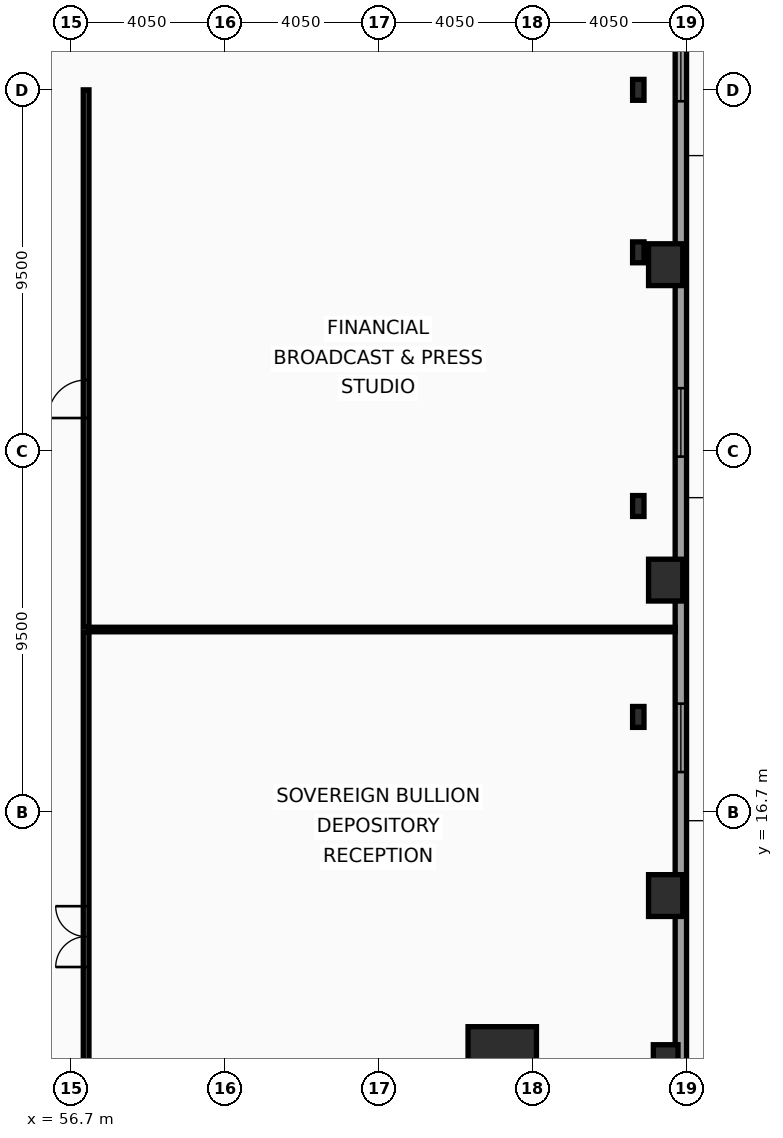
"""IFC4 building model, lengths in metres.
Left out: names, types, materials, properties, quantities, classifications, styles, units other than length and angle.
Written with IfcOpenShell. Run it as: python <this file> out.ifc"""

import sys

from ifc_helpers import new_model, si_unit, direction, frame, frame_2d, origin, origin_2d, place, context, subcontext, project, spatial, rectangle, hollow_rectangle, i_section, extrude, element, fill, save


model = new_model("IFC4")
c1 = context("Model", 3, precision=1e-05, world=origin(), true_north=direction((0.0, 1.0)))
c2 = subcontext(c1, "Body", "Model", "MODEL_VIEW")
j1 = project(units=[si_unit("LENGTHUNIT", "METRE"), si_unit("PLANEANGLEUNIT", "RADIAN")], contexts=[c1])
p1 = place(None, origin())
s1 = spatial("IfcSite", under=j1, at=p1, CompositionType="ELEMENT")
p2 = place(p1, origin())
s2 = spatial("IfcBuilding", under=s1, at=p2, CompositionType="ELEMENT")
p3 = place(p2, origin())
s3 = spatial("IfcBuildingStorey", under=s2, at=p3, CompositionType="ELEMENT", Elevation=0.0)
p4 = place(p3, frame((68.05, 10.15, 0.0), z_axis=(0.0, 0.0, 1.0), x_axis=(1.0, 0.0, 0.0)))
e1 = element("IfcColumn", 1, at=p4, inside=s3, PredefinedType="COLUMN", context=c2, shape_type="SweptSolid", body=[
    extrude(hollow_rectangle(XDim=1.8, YDim=1.8, WallThickness=0.08, at=origin_2d()), origin(), (0.0, 0.0, 1.0), 5.4),
])
for number, where, z_axis, x_axis in (
    (2, (71.63, 19.2, 0.0), (0.0, 0.0, 1.0), (1.0, 0.0, 0.0)),
    (3, (71.63, 24.75, 0.0), (0.0, 0.0, 1.0), (1.0, 0.0, 0.0)),
    (4, (71.63, 31.425, 0.0), (0.0, 0.0, 1.0), (1.0, 0.0, 0.0)),
    (5, (71.63, 35.7, 0.0), (0.0, 0.0, 1.0), (1.0, 0.0, 0.0)),
):
    element("IfcColumn", number, at=place(p3, frame(where, z_axis=z_axis, x_axis=x_axis)), inside=s3, PredefinedType="COLUMN", context=c2, shape_type="SweptSolid", body=[
        extrude(i_section(OverallWidth=0.3, OverallDepth=0.55, WebThickness=0.015, FlangeThickness=0.029, at=origin_2d()), origin(), (0.0, 0.0, 1.0), 5.4),
    ])
p5 = place(p3, frame((72.35, 10.15, 0.0), z_axis=(0.0, 0.0, 1.0), x_axis=(1.0, 0.0, 0.0)))
e6 = element("IfcColumn", 6, at=p5, inside=s3, PredefinedType="PILASTER", context=c2, shape_type="SweptSolid", body=[
    extrude(rectangle(XDim=0.65, YDim=0.85, at=origin_2d()), origin(), (0.0, 0.0, 1.0), 5.4),
])
for number, where, z_axis, x_axis in (
    (7, (72.35, 14.5, 0.0), (0.0, 0.0, 1.0), (1.0, 0.0, 0.0)),
    (8, (72.35, 22.8, 0.0), (0.0, 0.0, 1.0), (1.0, 0.0, 0.0)),
    (9, (72.35, 31.1, 0.0), (0.0, 0.0, 1.0), (1.0, 0.0, 0.0)),
):
    element("IfcColumn", number, at=place(p3, frame(where, z_axis=z_axis, x_axis=x_axis)), inside=s3, PredefinedType="PILASTER", context=c2, shape_type="SweptSolid", body=[
        extrude(rectangle(XDim=0.9, YDim=1.1, at=origin_2d()), origin(), (0.0, 0.0, 1.0), 5.4),
    ])
p6 = place(p3, frame((72.75, 0.3, 0.0), z_axis=(0.0, 0.0, 1.0), x_axis=(0.0, 1.0, 0.0)))
e10 = element("IfcWall", 10, at=p6, inside=s3, PredefinedType="SOLIDWALL", context=c2, shape_type="SweptSolid", body=[
    extrude(rectangle(XDim=49.275, YDim=0.3, at=frame_2d((24.637, 0.0))), origin(), (0.0, 0.0, 1.0), 4.54),
])
p7 = place(p6, frame((0.3, 0.0, 0.0)))
e11 = element("IfcOpeningElement", 11, at=p7, cuts=e10, PredefinedType="OPENING", context=c2, shape_type="SweptSolid", body=[
    extrude(rectangle(XDim=6.5, YDim=3.2, at=frame_2d((3.25, 1.6))), frame((0.0, 0.16, 0.0), z_axis=(0.0, -1.0, 0.0), x_axis=(1.0, 0.0, 0.0)), (0.0, 0.0, 1.0), 0.32),
])
p8 = place(p6, frame((44.8, 0.0, 0.0)))
e12 = element("IfcOpeningElement", 12, at=p8, cuts=e10, PredefinedType="OPENING", context=c2, shape_type="SweptSolid", body=[
    extrude(rectangle(XDim=1.1, YDim=2.25, at=frame_2d((0.55, 1.125))), frame((0.0, 0.16, 0.0), z_axis=(0.0, -1.0, 0.0), x_axis=(1.0, 0.0, 0.0)), (0.0, 0.0, 1.0), 0.32),
])
p9 = place(p6, frame((17.45, 0.0, 0.9)))
e13 = element("IfcOpeningElement", 13, at=p9, cuts=e10, PredefinedType="OPENING", context=c2, shape_type="SweptSolid", body=[
    extrude(rectangle(XDim=1.8, YDim=3.2, at=frame_2d((0.9, 1.6))), frame((0.0, 0.16, 0.0), z_axis=(0.0, -1.0, 0.0), x_axis=(1.0, 0.0, 0.0)), (0.0, 0.0, 1.0), 0.32),
])
p10 = place(p6, frame((25.75, 0.0, 0.9)))
e14 = element("IfcOpeningElement", 14, at=p10, cuts=e10, PredefinedType="OPENING", context=c2, shape_type="SweptSolid", body=[
    extrude(rectangle(XDim=1.8, YDim=3.2, at=frame_2d((0.9, 1.6))), frame((0.0, 0.16, 0.0), z_axis=(0.0, -1.0, 0.0), x_axis=(1.0, 0.0, 0.0)), (0.0, 0.0, 1.0), 0.32),
])
p11 = place(p6, frame((35.1, 0.0, 0.9)))
e15 = element("IfcOpeningElement", 15, at=p11, cuts=e10, PredefinedType="OPENING", context=c2, shape_type="SweptSolid", body=[
    extrude(rectangle(XDim=1.8, YDim=3.2, at=frame_2d((0.9, 1.6))), frame((0.0, 0.16, 0.0), z_axis=(0.0, -1.0, 0.0), x_axis=(1.0, 0.0, 0.0)), (0.0, 0.0, 1.0), 0.32),
])
p12 = place(p3, frame((57.1, 7.12, 0.0), z_axis=(0.0, 0.0, 1.0), x_axis=(0.0, 1.0, 0.0)))
e16 = element("IfcWall", 16, at=p12, inside=s3, PredefinedType="PARTITIONING", context=c2, shape_type="SweptSolid", body=[
    extrude(rectangle(XDim=14.315, YDim=0.15, at=frame_2d((7.157, 0.0))), origin(), (0.0, 0.0, 1.0), 4.29),
])
p13 = place(p12, frame((5.5, 0.0, 0.0)))
e17 = element("IfcOpeningElement", 17, at=p13, cuts=e16, PredefinedType="OPENING", context=c2, shape_type="SweptSolid", body=[
    extrude(rectangle(XDim=1.6, YDim=2.15, at=frame_2d((0.8, 1.075))), frame((0.0, 0.085, 0.0), z_axis=(0.0, -1.0, 0.0), x_axis=(1.0, 0.0, 0.0)), (0.0, 0.0, 1.0), 0.17),
])
p14 = place(p3, frame((57.1, 21.565, 0.0), z_axis=(0.0, 0.0, 1.0), x_axis=(0.0, 1.0, 0.0)))
e18 = element("IfcWall", 18, at=p14, inside=s3, PredefinedType="PARTITIONING", context=c2, shape_type="SweptSolid", body=[
    extrude(rectangle(XDim=14.135, YDim=0.15, at=frame_2d((7.067, 0.0))), origin(), (0.0, 0.0, 1.0), 4.29),
])
p15 = place(p14, frame((5.5, 0.0, 0.0)))
e19 = element("IfcOpeningElement", 19, at=p15, cuts=e18, PredefinedType="OPENING", context=c2, shape_type="SweptSolid", body=[
    extrude(rectangle(XDim=1.0, YDim=2.05, at=frame_2d((0.5, 1.025))), frame((0.0, 0.085, 0.0), z_axis=(0.0, -1.0, 0.0), x_axis=(1.0, 0.0, 0.0)), (0.0, 0.0, 1.0), 0.17),
])
p16 = place(p3, frame((57.18, 21.5, 0.0), z_axis=(0.0, 0.0, 1.0), x_axis=(1.0, 0.0, 0.0)))
e20 = element("IfcWall", 20, at=p16, inside=s3, PredefinedType="PARTITIONING", context=c2, shape_type="SweptSolid", body=[
    extrude(rectangle(XDim=15.42, YDim=0.12, at=frame_2d((7.71, 0.0))), origin(), (0.0, 0.0, 1.0), 4.54),
])
p17 = place(p9, origin())
e21 = element("IfcWindow", 21, at=p17, inside=s3, PartitioningType="SINGLE_PANEL", PredefinedType="WINDOW", context=c2, shape_type="SweptSolid", body=[
    extrude(rectangle(XDim=1.8, YDim=3.2, at=frame_2d((0.9, 1.6))), frame((0.0, 0.03, 0.0), z_axis=(0.0, -1.0, 0.0), x_axis=(1.0, 0.0, 0.0)), (0.0, 0.0, 1.0), 0.06),
])
fill(e13, e21)
p18 = place(p10, origin())
e22 = element("IfcWindow", 22, at=p18, inside=s3, PartitioningType="SINGLE_PANEL", PredefinedType="WINDOW", context=c2, shape_type="SweptSolid", body=[
    extrude(rectangle(XDim=1.8, YDim=3.2, at=frame_2d((0.9, 1.6))), frame((0.0, 0.03, 0.0), z_axis=(0.0, -1.0, 0.0), x_axis=(1.0, 0.0, 0.0)), (0.0, 0.0, 1.0), 0.06),
])
fill(e14, e22)
p19 = place(p11, origin())
e23 = element("IfcWindow", 23, at=p19, inside=s3, PartitioningType="SINGLE_PANEL", PredefinedType="WINDOW", context=c2, shape_type="SweptSolid", body=[
    extrude(rectangle(XDim=1.8, YDim=3.2, at=frame_2d((0.9, 1.6))), frame((0.0, 0.03, 0.0), z_axis=(0.0, -1.0, 0.0), x_axis=(1.0, 0.0, 0.0)), (0.0, 0.0, 1.0), 0.06),
])
fill(e15, e23)
p20 = place(p13, origin())
e24 = element("IfcDoor", 24, at=p20, inside=s3, OperationType="DOUBLE_DOOR_SINGLE_SWING", PredefinedType="DOOR", context=c2, shape_type="SweptSolid", body=[
    extrude(rectangle(XDim=1.6, YDim=2.15, at=frame_2d((0.8, 1.075))), frame((0.0, 0.025, 0.0), z_axis=(0.0, -1.0, 0.0), x_axis=(1.0, 0.0, 0.0)), (0.0, 0.0, 1.0), 0.05),
])
fill(e17, e24)
p21 = place(p15, origin())
e25 = element("IfcDoor", 25, at=p21, inside=s3, OperationType="SINGLE_SWING_LEFT", PredefinedType="DOOR", context=c2, shape_type="SweptSolid", body=[
    extrude(rectangle(XDim=1.0, YDim=2.05, at=frame_2d((0.5, 1.025))), frame((0.0, 0.025, 0.0), z_axis=(0.0, -1.0, 0.0), x_axis=(1.0, 0.0, 0.0)), (0.0, 0.0, 1.0), 0.05),
])
fill(e19, e25)
save(model, sys.argv[1])
